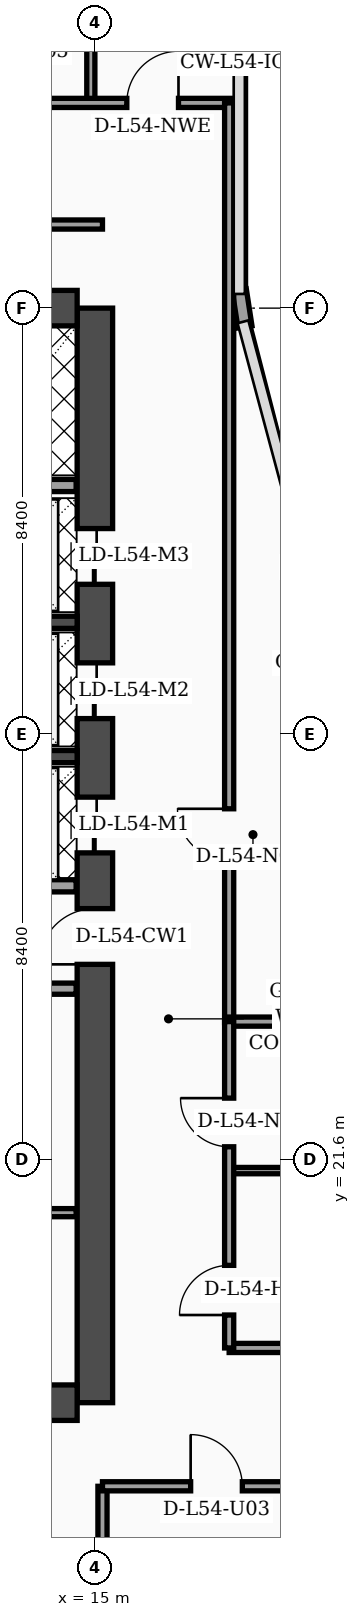
"""IFC4 building model, lengths in metres.
Left out: names, types, materials, properties, quantities, classifications, styles, units other than length and angle.
Written with IfcOpenShell. Run it as: python <this file> out.ifc"""

import sys

from ifc_helpers import new_model, si_unit, direction, frame, frame_2d, origin, place, context, subcontext, project, spatial, rectangle, extrude, element, fill, save


model = new_model("IFC4")
c1 = context("Model", 3, precision=1e-05, world=origin(), true_north=direction((0.0, 1.0)))
c2 = subcontext(c1, "Body", "Model", "MODEL_VIEW")
j1 = project(units=[si_unit("LENGTHUNIT", "METRE"), si_unit("PLANEANGLEUNIT", "RADIAN")], contexts=[c1])
p1 = place(None, origin())
s1 = spatial("IfcSite", under=j1, at=p1, CompositionType="ELEMENT")
p2 = place(p1, origin())
s2 = spatial("IfcBuilding", under=s1, at=p2, CompositionType="ELEMENT")
p3 = place(p2, frame((0.0, 0.0, 219.3)))
s3 = spatial("IfcBuildingStorey", under=s2, at=p3, CompositionType="ELEMENT", Elevation=219.3)
p4 = place(p3, frame((15.0, 16.8, 0.0), z_axis=(0.0, 0.0, 1.0), x_axis=(0.0, 1.0, 0.0)))
e1 = element("IfcWall", 1, at=p4, inside=s3, PredefinedType="SHEAR", context=c2, shape_type="SweptSolid", body=[
    extrude(rectangle(XDim=21.6, YDim=0.7, at=frame_2d((10.8, 0.0))), origin(), (0.0, 0.0, 1.0), 3.56),
])
p5 = place(p4, frame((8.65, 0.0, 0.0)))
e2 = element("IfcOpeningElement", 2, at=p5, cuts=e1, PredefinedType="OPENING", context=c2, shape_type="SweptSolid", body=[
    extrude(rectangle(XDim=1.1, YDim=2.2, at=frame_2d((0.55, 1.1))), frame((0.0, 0.36, 0.0), z_axis=(0.0, -1.0, 0.0), x_axis=(1.0, 0.0, 0.0)), (0.0, 0.0, 1.0), 0.72),
])
p6 = place(p4, frame((10.85, 0.0, 0.0)))
e3 = element("IfcOpeningElement", 3, at=p6, cuts=e1, PredefinedType="OPENING", context=c2, shape_type="SweptSolid", body=[
    extrude(rectangle(XDim=1.1, YDim=2.2, at=frame_2d((0.55, 1.1))), frame((0.0, 0.36, 0.0), z_axis=(0.0, -1.0, 0.0), x_axis=(1.0, 0.0, 0.0)), (0.0, 0.0, 1.0), 0.72),
])
p7 = place(p4, frame((13.5, 0.0, 0.0)))
e4 = element("IfcOpeningElement", 4, at=p7, cuts=e1, PredefinedType="OPENING", context=c2, shape_type="SweptSolid", body=[
    extrude(rectangle(XDim=1.1, YDim=2.2, at=frame_2d((0.55, 1.1))), frame((0.0, 0.36, 0.0), z_axis=(0.0, -1.0, 0.0), x_axis=(1.0, 0.0, 0.0)), (0.0, 0.0, 1.0), 0.72),
])
p8 = place(p4, frame((16.15, 0.0, 0.0)))
e5 = element("IfcOpeningElement", 5, at=p8, cuts=e1, PredefinedType="OPENING", context=c2, shape_type="SweptSolid", body=[
    extrude(rectangle(XDim=1.1, YDim=2.2, at=frame_2d((0.55, 1.1))), frame((0.0, 0.36, 0.0), z_axis=(0.0, -1.0, 0.0), x_axis=(1.0, 0.0, 0.0)), (0.0, 0.0, 1.0), 0.72),
])
for number, where, z_axis, x_axis in (
    (6, (4.55, 38.4, 0.0), (0.0, 0.0, 1.0), (1.0, 0.0, 0.0)),
    (7, (4.55, 16.8, 0.0), (0.0, 0.0, 1.0), (1.0, 0.0, 0.0)),
):
    element("IfcWall", number, at=place(p3, frame(where, z_axis=z_axis, x_axis=x_axis)), inside=s3, PredefinedType="SHEAR", context=c2, shape_type="SweptSolid", body=[
        extrude(rectangle(XDim=10.1, YDim=0.7, at=frame_2d((5.05, 0.0))), origin(), (0.0, 0.0, 1.0), 3.56),
    ])
for number, where, z_axis, x_axis in (
    (8, (12.18, 29.55, 0.0), (0.0, 0.0, 1.0), (1.0, 0.0, 0.0)),
    (9, (12.18, 32.2, 0.0), (0.0, 0.0, 1.0), (1.0, 0.0, 0.0)),
):
    element("IfcWall", number, at=place(p3, frame(where, z_axis=z_axis, x_axis=x_axis)), inside=s3, PredefinedType="SOLIDWALL", context=c2, shape_type="SweptSolid", body=[
        extrude(rectangle(XDim=2.47, YDim=0.24, at=frame_2d((1.235, 0.0))), origin(), (0.0, 0.0, 1.0), 3.56),
    ])
p9 = place(p3, frame((17.962, 38.03, 0.0), z_axis=(0.0, 0.0, 1.0), x_axis=(-0.15141125477, 0.988470855377, 0.0)))
e10 = element("IfcWall", 10, at=p9, inside=s3, PredefinedType="SOLIDWALL", context=c2, shape_type="SweptSolid", body=[
    extrude(rectangle(XDim=0.739, YDim=0.28, at=frame_2d((0.369, 0.0))), origin(), (0.0, 0.0, 1.0), 3.56),
])
p10 = place(p3, frame((9.68, 20.55, 0.0), z_axis=(0.0, 0.0, 1.0), x_axis=(1.0, 0.0, 0.0)))
e11 = element("IfcWall", 11, at=p10, inside=s3, PredefinedType="PARTITIONING", context=c2, shape_type="SweptSolid", body=[
    extrude(rectangle(XDim=4.95, YDim=0.16, at=frame_2d((2.475, 0.0))), origin(), (0.0, 0.0, 1.0), 3.56),
])
p11 = place(p10, frame((1.1, 0.0, 0.0)))
e12 = element("IfcOpeningElement", 12, at=p11, cuts=e11, PredefinedType="OPENING", context=c2, shape_type="SweptSolid", body=[
    extrude(rectangle(XDim=0.98, YDim=2.15, at=frame_2d((0.49, 1.075))), frame((0.0, 0.09, 0.0), z_axis=(0.0, -1.0, 0.0), x_axis=(1.0, 0.0, 0.0)), (0.0, 0.0, 1.0), 0.18),
])
p12 = place(p3, frame((9.68, 24.97, 0.0), z_axis=(0.0, 0.0, 1.0), x_axis=(1.0, 0.0, 0.0)))
e13 = element("IfcWall", 13, at=p12, inside=s3, PredefinedType="SOLIDWALL", context=c2, shape_type="SweptSolid", body=[
    extrude(rectangle(XDim=4.95, YDim=0.22, at=frame_2d((2.475, 0.0))), origin(), (0.0, 0.0, 1.0), 2.94),
])
p13 = place(p12, frame((0.9, 0.0, 0.0)))
e14 = element("IfcOpeningElement", 14, at=p13, cuts=e13, PredefinedType="OPENING", context=c2, shape_type="SweptSolid", body=[
    extrude(rectangle(XDim=0.98, YDim=2.15, at=frame_2d((0.49, 1.075))), frame((0.0, 0.12, 0.0), z_axis=(0.0, -1.0, 0.0), x_axis=(1.0, 0.0, 0.0)), (0.0, 0.0, 1.0), 0.24),
])
p14 = place(p3, frame((12.25, 27.0, 0.0), z_axis=(0.0, 0.0, 1.0), x_axis=(1.0, 0.0, 0.0)))
e15 = element("IfcWall", 15, at=p14, inside=s3, PredefinedType="SOLIDWALL", context=c2, shape_type="SweptSolid", body=[
    extrude(rectangle(XDim=2.38, YDim=0.24, at=frame_2d((1.19, 0.0))), origin(), (0.0, 0.0, 1.0), 3.56),
])
p15 = place(p3, frame((9.66, 34.9, 0.0), z_axis=(0.0, 0.0, 1.0), x_axis=(1.0, 0.0, 0.0)))
e16 = element("IfcWall", 16, at=p15, inside=s3, PredefinedType="SOLIDWALL", context=c2, shape_type="SweptSolid", body=[
    extrude(rectangle(XDim=4.97, YDim=0.24, at=frame_2d((2.485, 0.0))), origin(), (0.0, 0.0, 1.0), 3.56),
])
p16 = place(p3, frame((15.15, 2.44, 0.0), z_axis=(0.0, 0.0, 1.0), x_axis=(0.0, 1.0, 0.0)))
e17 = element("IfcWall", 17, at=p16, inside=s3, PredefinedType="PARTITIONING", context=c2, shape_type="SweptSolid", body=[
    extrude(rectangle(XDim=12.71, YDim=0.18, at=frame_2d((6.355, 0.0))), origin(), (0.0, 0.0, 1.0), 3.09),
])
p17 = place(p3, frame((15.15, 15.15, 0.0), z_axis=(0.0, 0.0, 1.0), x_axis=(1.0, 0.0, 0.0)))
e18 = element("IfcWall", 18, at=p17, inside=s3, PredefinedType="PARTITIONING", context=c2, shape_type="SweptSolid", body=[
    extrude(rectangle(XDim=6.45, YDim=0.18, at=frame_2d((3.225, 0.0))), origin(), (0.0, 0.0, 1.0), 2.59),
])
p18 = place(p17, frame((1.74, 0.0, 0.0)))
e19 = element("IfcOpeningElement", 19, at=p18, cuts=e18, PredefinedType="OPENING", context=c2, shape_type="SweptSolid", body=[
    extrude(rectangle(XDim=1.02, YDim=2.2, at=frame_2d((0.51, 1.1))), frame((0.0, 0.1, 0.0), z_axis=(0.0, -1.0, 0.0), x_axis=(1.0, 0.0, 0.0)), (0.0, 0.0, 1.0), 0.2),
])
p19 = place(p3, frame((14.92, 42.45, 0.0), z_axis=(0.0, 0.0, 1.0), x_axis=(0.0, 1.0, 0.0)))
e20 = element("IfcWall", 20, at=p19, inside=s3, PredefinedType="PARTITIONING", context=c2, shape_type="SweptSolid", body=[
    extrude(rectangle(XDim=5.35, YDim=0.16, at=frame_2d((2.675, 0.0))), origin(), (0.0, 0.0, 1.0), 3.09),
])
p20 = place(p3, frame((0.08, 42.45, 0.0), z_axis=(0.0, 0.0, 1.0), x_axis=(1.0, 0.0, 0.0)))
e21 = element("IfcWall", 21, at=p20, inside=s3, PredefinedType="PARTITIONING", context=c2, shape_type="SweptSolid", body=[
    extrude(rectangle(XDim=17.77, YDim=0.18, at=frame_2d((8.885, 0.0))), origin(), (0.0, 0.0, 1.0), 2.94),
])
p21 = place(p20, frame((0.9, 0.0, 0.0)))
e22 = element("IfcOpeningElement", 22, at=p21, cuts=e21, PredefinedType="OPENING", context=c2, shape_type="SweptSolid", body=[
    extrude(rectangle(XDim=1.02, YDim=2.2, at=frame_2d((0.51, 1.1))), frame((0.0, 0.1, 0.0), z_axis=(0.0, -1.0, 0.0), x_axis=(1.0, 0.0, 0.0)), (0.0, 0.0, 1.0), 0.2),
])
p22 = place(p20, frame((4.57, 0.0, 0.0)))
e23 = element("IfcOpeningElement", 23, at=p22, cuts=e21, PredefinedType="OPENING", context=c2, shape_type="SweptSolid", body=[
    extrude(rectangle(XDim=1.02, YDim=2.2, at=frame_2d((0.51, 1.1))), frame((0.0, 0.1, 0.0), z_axis=(0.0, -1.0, 0.0), x_axis=(1.0, 0.0, 0.0)), (0.0, 0.0, 1.0), 0.2),
])
p23 = place(p20, frame((10.46, 0.0, 0.0)))
e24 = element("IfcOpeningElement", 24, at=p23, cuts=e21, PredefinedType="OPENING", context=c2, shape_type="SweptSolid", body=[
    extrude(rectangle(XDim=1.02, YDim=2.2, at=frame_2d((0.51, 1.1))), frame((0.0, 0.1, 0.0), z_axis=(0.0, -1.0, 0.0), x_axis=(1.0, 0.0, 0.0)), (0.0, 0.0, 1.0), 0.2),
])
p24 = place(p20, frame((15.55, 0.0, 0.0)))
e25 = element("IfcOpeningElement", 25, at=p24, cuts=e21, PredefinedType="OPENING", context=c2, shape_type="SweptSolid", body=[
    extrude(rectangle(XDim=1.02, YDim=2.2, at=frame_2d((0.51, 1.1))), frame((0.0, 0.1, 0.0), z_axis=(0.0, -1.0, 0.0), x_axis=(1.0, 0.0, 0.0)), (0.0, 0.0, 1.0), 0.2),
])
p25 = place(p3, frame((17.65, 24.3, 0.0), z_axis=(0.0, 0.0, 1.0), x_axis=(0.0, 1.0, 0.0)))
e26 = element("IfcWall", 26, at=p25, inside=s3, PredefinedType="PARTITIONING", context=c2, shape_type="SweptSolid", body=[
    extrude(rectangle(XDim=18.15, YDim=0.18, at=frame_2d((9.075, 0.0))), origin(), (0.0, 0.0, 1.0), 2.94),
])
p26 = place(p25, frame((3.2, 0.0, 0.0)))
e27 = element("IfcOpeningElement", 27, at=p26, cuts=e26, PredefinedType="OPENING", context=c2, shape_type="SweptSolid", body=[
    extrude(rectangle(XDim=1.02, YDim=2.2, at=frame_2d((0.51, 1.1))), frame((0.0, 0.1, 0.0), z_axis=(0.0, -1.0, 0.0), x_axis=(1.0, 0.0, 0.0)), (0.0, 0.0, 1.0), 0.2),
])
p27 = place(p3, frame((3.83, 40.05, 0.0), z_axis=(0.0, 0.0, 1.0), x_axis=(1.0, 0.0, 0.0)))
e28 = element("IfcWall", 28, at=p27, inside=s3, PredefinedType="PARTITIONING", context=c2, shape_type="SweptSolid", body=[
    extrude(rectangle(XDim=11.32, YDim=0.18, at=frame_2d((5.66, 0.0))), origin(), (0.0, 0.0, 1.0), 2.94),
])
p28 = place(p3, frame((17.65, 17.88, 0.0), z_axis=(0.0, 0.0, 1.0), x_axis=(1.0, 0.0, 0.0)))
e29 = element("IfcWall", 29, at=p28, inside=s3, PredefinedType="PARTITIONING", context=c2, shape_type="SweptSolid", body=[
    extrude(rectangle(XDim=3.9, YDim=0.18, at=frame_2d((1.95, 0.0))), origin(), (0.0, 0.0, 1.0), 3.09),
])
p29 = place(p3, frame((17.65, 21.38, 0.0), z_axis=(0.0, 0.0, 1.0), x_axis=(1.0, 0.0, 0.0)))
e30 = element("IfcWall", 30, at=p29, inside=s3, PredefinedType="PARTITIONING", context=c2, shape_type="SweptSolid", body=[
    extrude(rectangle(XDim=3.9, YDim=0.125, at=frame_2d((1.95, 0.0))), origin(), (0.0, 0.0, 1.0), 3.56),
])
p30 = place(p3, frame((17.65, 24.32, 0.0), z_axis=(0.0, 0.0, 1.0), x_axis=(1.0, 0.0, 0.0)))
e31 = element("IfcWall", 31, at=p30, inside=s3, PredefinedType="PARTITIONING", context=c2, shape_type="SweptSolid", body=[
    extrude(rectangle(XDim=3.95, YDim=0.18, at=frame_2d((1.975, 0.0))), origin(), (0.0, 0.0, 1.0), 3.56),
])
p31 = place(p3, frame((17.65, 17.88, 0.0), z_axis=(0.0, 0.0, 1.0), x_axis=(0.0, 1.0, 0.0)))
e32 = element("IfcWall", 32, at=p31, inside=s3, PredefinedType="PARTITIONING", context=c2, shape_type="SweptSolid", body=[
    extrude(rectangle(XDim=6.44, YDim=0.18, at=frame_2d((3.22, 0.0))), origin(), (0.0, 0.0, 1.0), 3.09),
])
p32 = place(p31, frame((0.65, 0.0, 0.0)))
e33 = element("IfcOpeningElement", 33, at=p32, cuts=e32, PredefinedType="OPENING", context=c2, shape_type="SweptSolid", body=[
    extrude(rectangle(XDim=0.98, YDim=2.15, at=frame_2d((0.49, 1.075))), frame((0.0, 0.1, 0.0), z_axis=(0.0, -1.0, 0.0), x_axis=(1.0, 0.0, 0.0)), (0.0, 0.0, 1.0), 0.2),
])
p33 = place(p31, frame((3.97, 0.0, 0.0)))
e34 = element("IfcOpeningElement", 34, at=p33, cuts=e32, PredefinedType="OPENING", context=c2, shape_type="SweptSolid", body=[
    extrude(rectangle(XDim=0.96, YDim=2.2, at=frame_2d((0.48, 1.1))), frame((0.0, 0.1, 0.0), z_axis=(0.0, -1.0, 0.0), x_axis=(1.0, 0.0, 0.0)), (0.0, 0.0, 1.0), 0.2),
])
p34 = place(p18, origin())
e35 = element("IfcDoor", 35, at=p34, inside=s3, OperationType="SINGLE_SWING_LEFT", PredefinedType="DOOR", context=c2, shape_type="SweptSolid", body=[
    extrude(rectangle(XDim=1.02, YDim=2.2, at=frame_2d((0.51, 1.1))), frame((0.0, 0.025, 0.0), z_axis=(0.0, -1.0, 0.0), x_axis=(1.0, 0.0, 0.0)), (0.0, 0.0, 1.0), 0.05),
])
fill(e19, e35)
p35 = place(p24, origin())
e36 = element("IfcDoor", 36, at=p35, inside=s3, OperationType="SINGLE_SWING_RIGHT", PredefinedType="DOOR", context=c2, shape_type="SweptSolid", body=[
    extrude(rectangle(XDim=1.02, YDim=2.2, at=frame_2d((0.51, 1.1))), frame((0.0, 0.025, 0.0), z_axis=(0.0, -1.0, 0.0), x_axis=(1.0, 0.0, 0.0)), (0.0, 0.0, 1.0), 0.05),
])
fill(e25, e36)
p36 = place(p26, origin())
e37 = element("IfcDoor", 37, at=p36, inside=s3, OperationType="SINGLE_SWING_RIGHT", PredefinedType="DOOR", context=c2, shape_type="SweptSolid", body=[
    extrude(rectangle(XDim=1.02, YDim=2.2, at=frame_2d((0.51, 1.1))), frame((0.0, 0.025, 0.0), z_axis=(0.0, -1.0, 0.0), x_axis=(1.0, 0.0, 0.0)), (0.0, 0.0, 1.0), 0.05),
])
fill(e27, e37)
p37 = place(p32, origin())
e38 = element("IfcDoor", 38, at=p37, inside=s3, OperationType="SINGLE_SWING_LEFT", PredefinedType="DOOR", context=c2, shape_type="SweptSolid", body=[
    extrude(rectangle(XDim=0.98, YDim=2.15, at=frame_2d((0.49, 1.075))), frame((0.0, 0.025, 0.0), z_axis=(0.0, -1.0, 0.0), x_axis=(1.0, 0.0, 0.0)), (0.0, 0.0, 1.0), 0.05),
])
fill(e33, e38)
p38 = place(p33, origin())
e39 = element("IfcDoor", 39, at=p38, inside=s3, OperationType="SINGLE_SWING_RIGHT", PredefinedType="DOOR", context=c2, shape_type="SweptSolid", body=[
    extrude(rectangle(XDim=0.96, YDim=2.2, at=frame_2d((0.48, 1.1))), frame((0.0, 0.025, 0.0), z_axis=(0.0, -1.0, 0.0), x_axis=(1.0, 0.0, 0.0)), (0.0, 0.0, 1.0), 0.05),
])
fill(e34, e39)
p39 = place(p5, origin())
e40 = element("IfcDoor", 40, at=p39, inside=s3, OperationType="SINGLE_SWING_LEFT", PredefinedType="DOOR", context=c2, shape_type="SweptSolid", body=[
    extrude(rectangle(XDim=1.1, YDim=2.2, at=frame_2d((0.55, 1.1))), frame((0.0, 0.025, 0.0), z_axis=(0.0, -1.0, 0.0), x_axis=(1.0, 0.0, 0.0)), (0.0, 0.0, 1.0), 0.05),
])
fill(e2, e40)
p40 = place(p6, origin())
e41 = element("IfcDoor", 41, at=p40, inside=s3, OperationType="DOUBLE_DOOR_SLIDING", PredefinedType="DOOR", context=c2, shape_type="SweptSolid", body=[
    extrude(rectangle(XDim=1.1, YDim=2.2, at=frame_2d((0.55, 1.1))), frame((0.0, 0.025, 0.0), z_axis=(0.0, -1.0, 0.0), x_axis=(1.0, 0.0, 0.0)), (0.0, 0.0, 1.0), 0.05),
])
fill(e3, e41)
p41 = place(p7, origin())
e42 = element("IfcDoor", 42, at=p41, inside=s3, OperationType="DOUBLE_DOOR_SLIDING", PredefinedType="DOOR", context=c2, shape_type="SweptSolid", body=[
    extrude(rectangle(XDim=1.1, YDim=2.2, at=frame_2d((0.55, 1.1))), frame((0.0, 0.025, 0.0), z_axis=(0.0, -1.0, 0.0), x_axis=(1.0, 0.0, 0.0)), (0.0, 0.0, 1.0), 0.05),
])
fill(e4, e42)
p42 = place(p8, origin())
e43 = element("IfcDoor", 43, at=p42, inside=s3, OperationType="DOUBLE_DOOR_SLIDING", PredefinedType="DOOR", context=c2, shape_type="SweptSolid", body=[
    extrude(rectangle(XDim=1.1, YDim=2.2, at=frame_2d((0.55, 1.1))), frame((0.0, 0.025, 0.0), z_axis=(0.0, -1.0, 0.0), x_axis=(1.0, 0.0, 0.0)), (0.0, 0.0, 1.0), 0.05),
])
fill(e5, e43)
save(model, sys.argv[1])
